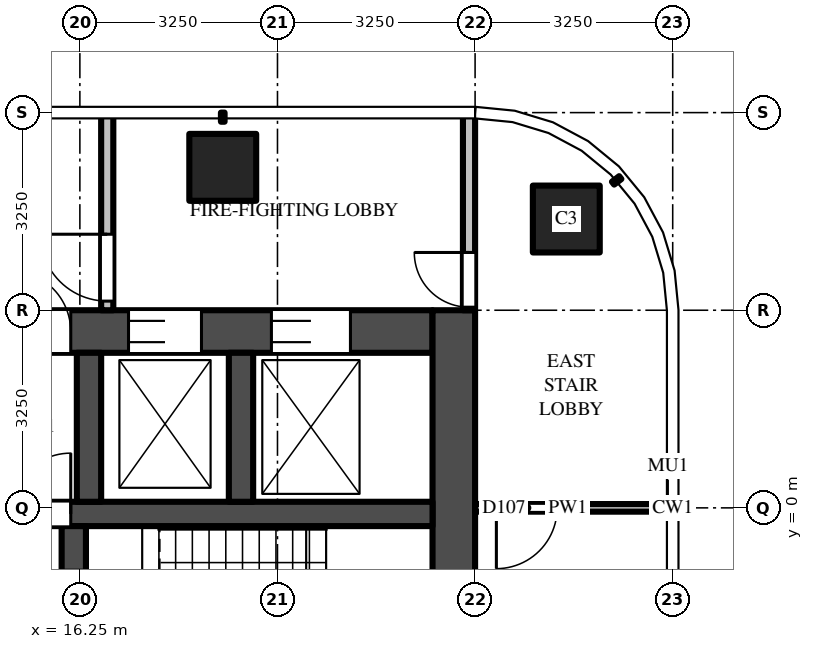
"""IFC4 building model, lengths in metres.
Left out: names, types, materials, properties, quantities, classifications, styles, units other than length and angle.
Written with IfcOpenShell. Run it as: python <this file> out.ifc"""

import sys

from ifc_helpers import new_model, si_unit, direction, frame, frame_2d, origin, origin_2d, place, context, subcontext, project, spatial, rectangle, extrude, source, transform, mapped, element, fill, save


model = new_model("IFC4")
c1 = context("Model", 3, precision=1e-05, world=origin(), true_north=direction((0.0, 1.0)))
c2 = subcontext(c1, "Body", "Model", "MODEL_VIEW")
j1 = project(units=[si_unit("LENGTHUNIT", "METRE"), si_unit("PLANEANGLEUNIT", "RADIAN")], contexts=[c1])
p1 = place(None, origin())
s1 = spatial("IfcSite", under=j1, at=p1, CompositionType="ELEMENT")
p2 = place(p1, origin())
s2 = spatial("IfcBuilding", under=s1, at=p2, CompositionType="ELEMENT")
p3 = place(p2, frame((0.0, 0.0, 232.4)))
s3 = spatial("IfcBuildingStorey", under=s2, at=p3, CompositionType="ELEMENT", Elevation=232.4)
m1 = source(origin(), c2, "Body", "SweptSolid", [
    extrude(rectangle(XDim=1.1, YDim=1.1, at=origin_2d()), origin(), (0.0, 0.0, 1.0), 3.9),
])
for number, where, z_axis, x_axis in (
    (1, (18.6, 5.6, 0.0), (0.0, 0.0, 1.0), (1.0, 0.0, 0.0)),
    (2, (24.25, 4.75, 0.0), (0.0, 0.0, 1.0), (1.0, 0.0, 0.0)),
):
    element("IfcColumn", number, at=place(p3, frame(where, z_axis=z_axis, x_axis=x_axis)), inside=s3, PredefinedType="COLUMN", context=c2, shape_type="MappedRepresentation", body=[
        mapped(m1, transform((0.0, 0.0, 0.0))),
    ])
m2 = source(origin(), c2, "Body", "SweptSolid", [
    extrude(rectangle(XDim=14.85, YDim=0.7, at=frame_2d((7.425, 0.0))), origin(), (0.0, 0.0, 1.0), 3.7),
])
p4 = place(p3, frame((7.2, 2.9, 0.0), z_axis=(0.0, 0.0, 1.0), x_axis=(1.0, 0.0, 0.0)))
e3 = element("IfcWall", 3, at=p4, inside=s3, PredefinedType="SHEAR", context=c2, shape_type="MappedRepresentation", body=[
    mapped(m2, transform((0.0, 0.0, 0.0))),
])
m3 = source(origin(), c2, "Body", "SweptSolid", [
    extrude(rectangle(XDim=1.1, YDim=2.1, at=frame_2d((0.55, 1.05))), frame((0.0, 0.36, 0.0), z_axis=(0.0, -1.0, 0.0), x_axis=(1.0, 0.0, 0.0)), (0.0, 0.0, 1.0), 0.72),
])
p5 = place(p4, frame((0.55, 0.0, 0.0)))
e4 = element("IfcOpeningElement", 4, at=p5, cuts=e3, PredefinedType="OPENING", context=c2, shape_type="MappedRepresentation", body=[
    mapped(m3, transform((0.0, 0.0, 0.0))),
])
p6 = place(p4, frame((3.15, 0.0, 0.0)))
e5 = element("IfcOpeningElement", 5, at=p6, cuts=e3, PredefinedType="OPENING", context=c2, shape_type="MappedRepresentation", body=[
    mapped(m3, transform((0.0, 0.0, 0.0))),
])
m4 = source(origin(), c2, "Body", "SweptSolid", [
    extrude(rectangle(XDim=1.2, YDim=2.1, at=frame_2d((0.6, 1.05))), frame((0.0, 0.36, 0.0), z_axis=(0.0, -1.0, 0.0), x_axis=(1.0, 0.0, 0.0)), (0.0, 0.0, 1.0), 0.72),
])
p7 = place(p4, frame((5.7, 0.0, 0.0)))
e6 = element("IfcOpeningElement", 6, at=p7, cuts=e3, PredefinedType="OPENING", context=c2, shape_type="MappedRepresentation", body=[
    mapped(m4, transform((0.0, 0.0, 0.0))),
])
m5 = source(origin(), c2, "Body", "SweptSolid", [
    extrude(rectangle(XDim=1.3, YDim=2.1, at=frame_2d((0.65, 1.05))), frame((0.0, 0.36, 0.0), z_axis=(0.0, -1.0, 0.0), x_axis=(1.0, 0.0, 0.0)), (0.0, 0.0, 1.0), 0.72),
])
p8 = place(p4, frame((12.2, 0.0, 0.0)))
e7 = element("IfcOpeningElement", 7, at=p8, cuts=e3, PredefinedType="OPENING", context=c2, shape_type="MappedRepresentation", body=[
    mapped(m5, transform((0.0, 0.0, 0.0))),
])
p9 = place(p4, frame((9.85, 0.0, 0.0)))
e8 = element("IfcOpeningElement", 8, at=p9, cuts=e3, PredefinedType="OPENING", context=c2, shape_type="MappedRepresentation", body=[
    mapped(m4, transform((0.0, 0.0, 0.0))),
])
m6 = source(origin(), c2, "Body", "SweptSolid", [
    extrude(rectangle(XDim=1.0, YDim=2.1, at=frame_2d((0.5, 1.05))), frame((0.0, 0.36, 0.0), z_axis=(0.0, -1.0, 0.0), x_axis=(1.0, 0.0, 0.0)), (0.0, 0.0, 1.0), 0.72),
])
p10 = place(p4, frame((7.9, 0.0, 0.0)))
e9 = element("IfcOpeningElement", 9, at=p10, cuts=e3, PredefinedType="OPENING", context=c2, shape_type="MappedRepresentation", body=[
    mapped(m6, transform((0.0, 0.0, 0.0))),
])
m7 = source(origin(), c2, "Body", "SweptSolid", [
    extrude(rectangle(XDim=9.05, YDim=0.7, at=frame_2d((4.525, 0.0))), origin(), (0.0, 0.0, 1.0), 3.7),
])
p11 = place(p3, frame((22.4, -5.8, 0.0), z_axis=(0.0, 0.0, 1.0), x_axis=(0.0, 1.0, 0.0)))
e10 = element("IfcWall", 10, at=p11, inside=s3, PredefinedType="SHEAR", context=c2, shape_type="MappedRepresentation", body=[
    mapped(m7, transform((0.0, 0.0, 0.0))),
])
m8 = source(origin(), c2, "Body", "SweptSolid", [
    extrude(rectangle(XDim=14.85, YDim=0.4, at=frame_2d((7.425, 0.0))), origin(), (0.0, 0.0, 1.0), 3.7),
])
p12 = place(p3, frame((7.2, -0.1, 0.0), z_axis=(0.0, 0.0, 1.0), x_axis=(1.0, 0.0, 0.0)))
e11 = element("IfcWall", 11, at=p12, inside=s3, PredefinedType="SHEAR", context=c2, shape_type="MappedRepresentation", body=[
    mapped(m8, transform((0.0, 0.0, 0.0))),
])
m9 = source(origin(), c2, "Body", "SweptSolid", [
    extrude(rectangle(XDim=1.0, YDim=2.1, at=frame_2d((0.5, 1.05))), frame((0.0, 0.21, 0.0), z_axis=(0.0, -1.0, 0.0), x_axis=(1.0, 0.0, 0.0)), (0.0, 0.0, 1.0), 0.42),
])
p13 = place(p12, frame((7.9, 0.0, 0.0)))
e12 = element("IfcOpeningElement", 12, at=p13, cuts=e11, PredefinedType="OPENING", context=c2, shape_type="MappedRepresentation", body=[
    mapped(m9, transform((0.0, 0.0, 0.0))),
])
m10 = source(origin(), c2, "Body", "SweptSolid", [
    extrude(rectangle(XDim=5.5, YDim=0.4, at=frame_2d((2.75, 0.0))), origin(), (0.0, 0.0, 1.0), 3.7),
])
p14 = place(p3, frame((16.15, -5.8, 0.0), z_axis=(0.0, 0.0, 1.0), x_axis=(0.0, 1.0, 0.0)))
e13 = element("IfcWall", 13, at=p14, inside=s3, PredefinedType="SHEAR", context=c2, shape_type="MappedRepresentation", body=[
    mapped(m10, transform((0.0, 0.0, 0.0))),
])
m11 = source(origin(), c2, "Body", "SweptSolid", [
    extrude(rectangle(XDim=1.1, YDim=2.1, at=frame_2d((0.55, 1.05))), frame((0.0, 0.21, 0.0), z_axis=(0.0, -1.0, 0.0), x_axis=(1.0, 0.0, 0.0)), (0.0, 0.0, 1.0), 0.42),
])
p15 = place(p14, frame((0.725, 0.0, 0.0)))
e14 = element("IfcOpeningElement", 14, at=p15, cuts=e13, PredefinedType="OPENING", context=c2, shape_type="MappedRepresentation", body=[
    mapped(m11, transform((0.0, 0.0, 0.0))),
])
p16 = place(p14, frame((3.675, 0.0, 0.0)))
e15 = element("IfcOpeningElement", 15, at=p16, cuts=e13, PredefinedType="OPENING", context=c2, shape_type="MappedRepresentation", body=[
    mapped(m11, transform((0.0, 0.0, 0.0))),
])
m12 = source(origin(), c2, "Body", "SweptSolid", [
    extrude(rectangle(XDim=2.45, YDim=0.4, at=frame_2d((1.225, 0.0))), origin(), (0.0, 0.0, 1.0), 3.7),
])
for number, where, z_axis, x_axis in (
    (16, (16.4, 0.1, 0.0), (0.0, 0.0, 1.0), (0.0, 1.0, 0.0)),
    (17, (18.9, 0.1, 0.0), (0.0, 0.0, 1.0), (0.0, 1.0, 0.0)),
):
    element("IfcWall", number, at=place(p3, frame(where, z_axis=z_axis, x_axis=x_axis)), inside=s3, PredefinedType="SHEAR", context=c2, shape_type="MappedRepresentation", body=[
        mapped(m12, transform((0.0, 0.0, 0.0))),
    ])
m13 = source(origin(), c2, "Body", "SweptSolid", [
    extrude(rectangle(XDim=3.25, YDim=0.2, at=frame_2d((1.625, 0.0))), origin(), (0.0, 0.0, 1.0), 3.7),
])
p17 = place(p3, frame((16.7, 3.25, 0.0), z_axis=(0.0, 0.0, 1.0), x_axis=(0.0, 1.0, 0.0)))
e18 = element("IfcWall", 18, at=p17, inside=s3, PredefinedType="PARTITIONING", context=c2, shape_type="MappedRepresentation", body=[
    mapped(m13, transform((0.0, 0.0, 0.0))),
])
m14 = source(origin(), c2, "Body", "SweptSolid", [
    extrude(rectangle(XDim=1.1, YDim=2.1, at=frame_2d((0.55, 1.05))), frame((0.0, 0.11, 0.0), z_axis=(0.0, -1.0, 0.0), x_axis=(1.0, 0.0, 0.0)), (0.0, 0.0, 1.0), 0.22),
])
p18 = place(p17, frame((0.15, 0.0, 0.0)))
e19 = element("IfcOpeningElement", 19, at=p18, cuts=e18, PredefinedType="OPENING", context=c2, shape_type="MappedRepresentation", body=[
    mapped(m14, transform((0.0, 0.0, 0.0))),
])
p19 = place(p3, frame((22.65, 3.25, 0.0), z_axis=(0.0, 0.0, 1.0), x_axis=(0.0, 1.0, 0.0)))
e20 = element("IfcWall", 20, at=p19, inside=s3, PredefinedType="PARTITIONING", context=c2, shape_type="MappedRepresentation", body=[
    mapped(m13, transform((0.0, 0.0, 0.0))),
])
m15 = source(origin(), c2, "Body", "SweptSolid", [
    extrude(rectangle(XDim=0.9, YDim=2.1, at=frame_2d((0.45, 1.05))), frame((0.0, 0.11, 0.0), z_axis=(0.0, -1.0, 0.0), x_axis=(1.0, 0.0, 0.0)), (0.0, 0.0, 1.0), 0.22),
])
p20 = place(p19, frame((0.05, 0.0, 0.0)))
e21 = element("IfcOpeningElement", 21, at=p20, cuts=e20, PredefinedType="OPENING", context=c2, shape_type="MappedRepresentation", body=[
    mapped(m15, transform((0.0, 0.0, 0.0))),
])
m16 = source(origin(), c2, "Body", "SweptSolid", [
    extrude(rectangle(XDim=3.05, YDim=0.125, at=frame_2d((1.525, 0.0))), origin(), (0.0, 0.0, 1.0), 2.78),
])
p21 = place(p3, frame((25.8, 0.0, 0.0), z_axis=(0.0, 0.0, 1.0), x_axis=(-1.0, 0.0, 0.0)))
e22 = element("IfcWall", 22, at=p21, inside=s3, PredefinedType="PARTITIONING", context=c2, shape_type="MappedRepresentation", body=[
    mapped(m16, transform((0.0, 0.0, 0.0))),
])
m17 = source(origin(), c2, "Body", "SweptSolid", [
    extrude(rectangle(XDim=1.0, YDim=2.1, at=frame_2d((0.5, 1.05))), frame((0.0, 0.073, 0.0), z_axis=(0.0, -1.0, 0.0), x_axis=(1.0, 0.0, 0.0)), (0.0, 0.0, 1.0), 0.145),
])
p22 = place(p21, frame((1.7, 0.0, 0.0)))
e23 = element("IfcOpeningElement", 23, at=p22, cuts=e22, PredefinedType="OPENING", context=c2, shape_type="MappedRepresentation", body=[
    mapped(m17, transform((0.0, 0.0, 0.0))),
])
m18 = source(origin(), c2, "Body", "SweptSolid", [
    extrude(rectangle(XDim=1.3, YDim=2.1, at=frame_2d((0.65, 1.05))), frame((0.0, -0.275, 0.0), z_axis=(0.0, -1.0, 0.0), x_axis=(1.0, 0.0, 0.0)), (0.0, 0.0, 1.0), 0.05),
])
p23 = place(p8, origin())
e24 = element("IfcDoor", 24, at=p23, inside=s3, OperationType="DOUBLE_DOOR_SLIDING", PredefinedType="DOOR", context=c2, shape_type="MappedRepresentation", body=[
    mapped(m18, transform((0.0, 0.0, 0.0))),
])
fill(e7, e24)
m19 = source(origin(), c2, "Body", "SweptSolid", [
    extrude(rectangle(XDim=1.2, YDim=2.1, at=frame_2d((0.6, 1.05))), frame((0.0, -0.275, 0.0), z_axis=(0.0, -1.0, 0.0), x_axis=(1.0, 0.0, 0.0)), (0.0, 0.0, 1.0), 0.05),
])
p24 = place(p9, origin())
e25 = element("IfcDoor", 25, at=p24, inside=s3, OperationType="DOUBLE_DOOR_SLIDING", PredefinedType="DOOR", context=c2, shape_type="MappedRepresentation", body=[
    mapped(m19, transform((0.0, 0.0, 0.0))),
])
fill(e8, e25)
m20 = source(origin(), c2, "Body", "SweptSolid", [
    extrude(rectangle(XDim=1.0, YDim=2.1, at=frame_2d((0.5, 1.05))), frame((0.0, 0.025, 0.0), z_axis=(0.0, -1.0, 0.0), x_axis=(1.0, 0.0, 0.0)), (0.0, 0.0, 1.0), 0.05),
])
p25 = place(p13, origin())
e26 = element("IfcDoor", 26, at=p25, inside=s3, OperationType="SINGLE_SWING_RIGHT", PredefinedType="DOOR", context=c2, shape_type="MappedRepresentation", body=[
    mapped(m20, transform((0.0, 0.0, 0.0))),
])
fill(e12, e26)
m21 = source(origin(), c2, "Body", "SweptSolid", [
    extrude(rectangle(XDim=1.0, YDim=2.1, at=frame_2d((0.5, 1.05))), frame((0.0, -0.275, 0.0), z_axis=(0.0, -1.0, 0.0), x_axis=(1.0, 0.0, 0.0)), (0.0, 0.0, 1.0), 0.05),
])
p26 = place(p10, origin())
e27 = element("IfcDoor", 27, at=p26, inside=s3, OperationType="SINGLE_SWING_LEFT", PredefinedType="DOOR", context=c2, shape_type="MappedRepresentation", body=[
    mapped(m21, transform((0.0, 0.0, 0.0))),
])
fill(e9, e27)
m22 = source(origin(), c2, "Body", "SweptSolid", [
    extrude(rectangle(XDim=1.1, YDim=2.1, at=frame_2d((0.55, 1.05))), frame((0.0, 0.025, 0.0), z_axis=(0.0, -1.0, 0.0), x_axis=(1.0, 0.0, 0.0)), (0.0, 0.0, 1.0), 0.05),
])
p27 = place(p18, origin())
e28 = element("IfcDoor", 28, at=p27, inside=s3, OperationType="SINGLE_SWING_RIGHT", PredefinedType="DOOR", context=c2, shape_type="MappedRepresentation", body=[
    mapped(m22, transform((0.0, 0.0, 0.0))),
])
fill(e19, e28)
m23 = source(origin(), c2, "Body", "SweptSolid", [
    extrude(rectangle(XDim=0.9, YDim=2.1, at=frame_2d((0.45, 1.05))), frame((0.0, 0.025, 0.0), z_axis=(0.0, -1.0, 0.0), x_axis=(1.0, 0.0, 0.0)), (0.0, 0.0, 1.0), 0.05),
])
p28 = place(p20, origin())
e29 = element("IfcDoor", 29, at=p28, inside=s3, OperationType="SINGLE_SWING_RIGHT", PredefinedType="DOOR", context=c2, shape_type="MappedRepresentation", body=[
    mapped(m23, transform((0.0, 0.0, 0.0))),
])
fill(e21, e29)
p29 = place(p22, origin())
e30 = element("IfcDoor", 30, at=p29, inside=s3, OperationType="SINGLE_SWING_RIGHT", PredefinedType="DOOR", context=c2, shape_type="MappedRepresentation", body=[
    mapped(m20, transform((0.0, 0.0, 0.0))),
])
fill(e23, e30)
save(model, sys.argv[1])
